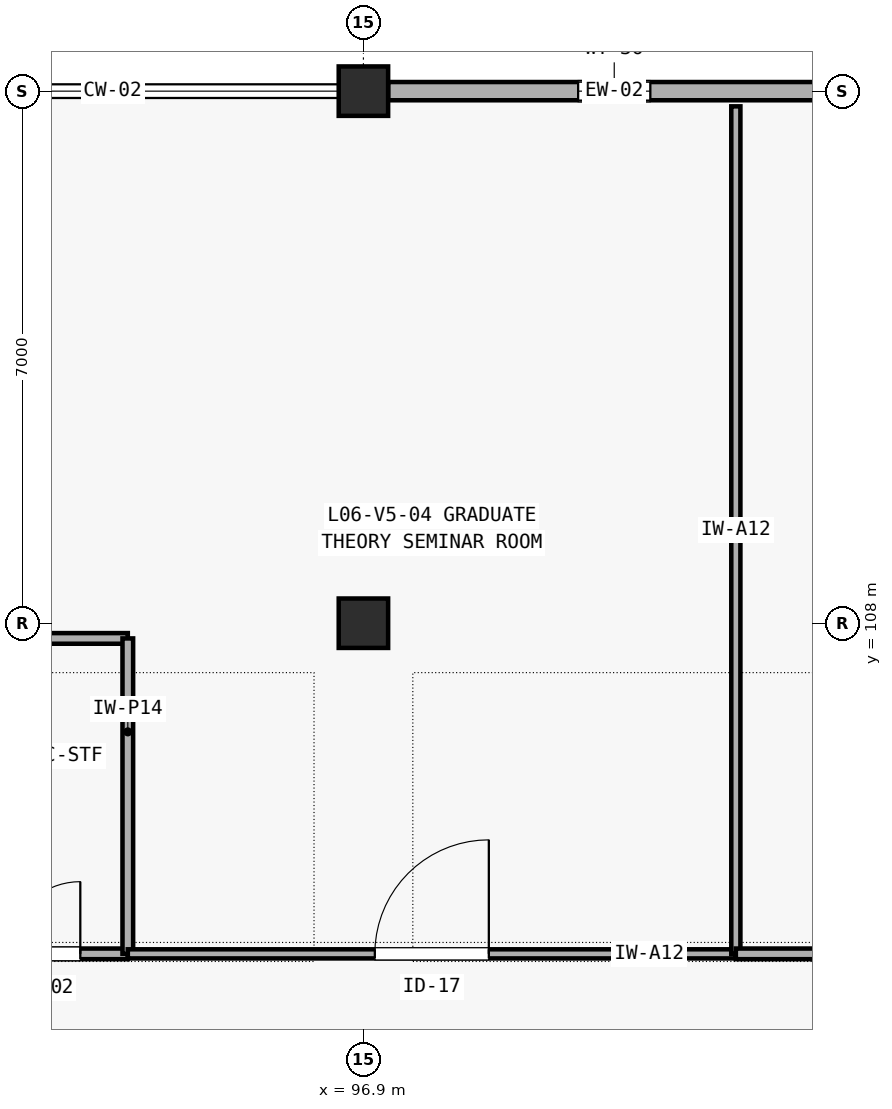
"""IFC4 building model, lengths in metres.
Left out: names, types, materials, properties, quantities, classifications, styles, units other than length and angle.
Written with IfcOpenShell. Run it as: python <this file> out.ifc"""

import sys

from ifc_helpers import new_model, si_unit, direction, frame, frame_2d, origin, origin_2d, place, context, subcontext, project, spatial, rectangle, extrude, element, fill, save


model = new_model("IFC4")
c1 = context("Model", 3, precision=1e-05, world=origin(), true_north=direction((0.0, 1.0)))
c2 = subcontext(c1, "Body", "Model", "MODEL_VIEW")
j1 = project(units=[si_unit("LENGTHUNIT", "METRE"), si_unit("PLANEANGLEUNIT", "RADIAN")], contexts=[c1])
p1 = place(None, origin())
s1 = spatial("IfcSite", under=j1, at=p1, CompositionType="ELEMENT")
p2 = place(p1, origin())
s2 = spatial("IfcBuilding", under=s1, at=p2, CompositionType="ELEMENT")
p3 = place(p2, frame((0.0, 0.0, 25.2)))
s3 = spatial("IfcBuildingStorey", under=s2, at=p3, CompositionType="ELEMENT", Elevation=25.2)
for number, where, z_axis, x_axis in (
    (1, (96.9, 108.0, 0.0), (0.0, 0.0, 1.0), (1.0, 0.0, 0.0)),
    (2, (96.9, 115.0, 0.0), (0.0, 0.0, 1.0), (1.0, 0.0, 0.0)),
):
    element("IfcColumn", number, at=place(p3, frame(where, z_axis=z_axis, x_axis=x_axis)), inside=s3, PredefinedType="COLUMN", context=c2, shape_type="SweptSolid", body=[
        extrude(rectangle(XDim=0.65, YDim=0.65, at=origin_2d()), origin(), (0.0, 0.0, 1.0), 4.2),
    ])
p4 = place(p3, frame((97.225, 115.0, 0.0), z_axis=(0.0, 0.0, 1.0), x_axis=(1.0, 0.0, 0.0)))
e3 = element("IfcWall", 3, at=p4, inside=s3, PredefinedType="SOLIDWALL", context=c2, shape_type="SweptSolid", body=[
    extrude(rectangle(XDim=5.95, YDim=0.24, at=frame_2d((2.975, 0.0))), origin(), (0.0, 0.0, 1.0), 3.285),
])
p5 = place(p4, frame((2.5, 0.0, 0.85)))
e4 = element("IfcOpeningElement", 4, at=p5, cuts=e3, PredefinedType="OPENING", context=c2, shape_type="SweptSolid", body=[
    extrude(rectangle(XDim=0.95, YDim=1.55, at=frame_2d((0.475, 0.775))), frame((0.0, 0.13, 0.0), z_axis=(0.0, -1.0, 0.0), x_axis=(1.0, 0.0, 0.0)), (0.0, 0.0, 1.0), 0.26),
])
p6 = place(p3, frame((91.6, 103.65, 0.0), z_axis=(0.0, 0.0, 1.0), x_axis=(1.0, 0.0, 0.0)))
e5 = element("IfcWall", 5, at=p6, inside=s3, PredefinedType="PLUMBINGWALL", context=c2, shape_type="SweptSolid", body=[
    extrude(rectangle(XDim=2.2, YDim=0.14, at=frame_2d((1.1, 0.0))), origin(), (0.0, 0.0, 1.0), 3.9),
])
p7 = place(p6, frame((0.625, 0.0, 0.0)))
e6 = element("IfcOpeningElement", 6, at=p7, cuts=e5, PredefinedType="OPENING", context=c2, shape_type="SweptSolid", body=[
    extrude(rectangle(XDim=0.95, YDim=2.1, at=frame_2d((0.475, 1.05))), frame((0.0, 0.08, 0.0), z_axis=(0.0, -1.0, 0.0), x_axis=(1.0, 0.0, 0.0)), (0.0, 0.0, 1.0), 0.16),
])
p8 = place(p3, frame((91.6, 107.8, 0.0), z_axis=(0.0, 0.0, 1.0), x_axis=(1.0, 0.0, 0.0)))
e7 = element("IfcWall", 7, at=p8, inside=s3, PredefinedType="PLUMBINGWALL", context=c2, shape_type="SweptSolid", body=[
    extrude(rectangle(XDim=2.2, YDim=0.14, at=frame_2d((1.1, 0.0))), origin(), (0.0, 0.0, 1.0), 3.235),
])
p9 = place(p3, frame((93.8, 103.65, 0.0), z_axis=(0.0, 0.0, 1.0), x_axis=(0.0, 1.0, 0.0)))
e8 = element("IfcWall", 8, at=p9, inside=s3, PredefinedType="PLUMBINGWALL", context=c2, shape_type="SweptSolid", body=[
    extrude(rectangle(XDim=4.15, YDim=0.14, at=frame_2d((2.075, 0.0))), origin(), (0.0, 0.0, 1.0), 3.9),
])
p10 = place(p3, frame((93.8, 103.65, 0.0), z_axis=(0.0, 0.0, 1.0), x_axis=(1.0, 0.0, 0.0)))
e9 = element("IfcWall", 9, at=p10, inside=s3, PredefinedType="PARTITIONING", context=c2, shape_type="SweptSolid", body=[
    extrude(rectangle(XDim=8.0, YDim=0.12, at=frame_2d((4.0, 0.0))), origin(), (0.0, 0.0, 1.0), 3.9),
])
p11 = place(p10, frame((3.25, 0.0, 0.0)))
e10 = element("IfcOpeningElement", 10, at=p11, cuts=e9, PredefinedType="OPENING", context=c2, shape_type="SweptSolid", body=[
    extrude(rectangle(XDim=1.5, YDim=2.15, at=frame_2d((0.75, 1.075))), frame((0.0, 0.07, 0.0), z_axis=(0.0, -1.0, 0.0), x_axis=(1.0, 0.0, 0.0)), (0.0, 0.0, 1.0), 0.14),
])
p12 = place(p3, frame((101.8, 103.65, 0.0), z_axis=(0.0, 0.0, 1.0), x_axis=(0.0, 1.0, 0.0)))
e11 = element("IfcWall", 11, at=p12, inside=s3, PredefinedType="PARTITIONING", context=c2, shape_type="SweptSolid", body=[
    extrude(rectangle(XDim=11.15, YDim=0.12, at=frame_2d((5.575, 0.0))), origin(), (0.0, 0.0, 1.0), 3.9),
])
p13 = place(p3, frame((101.8, 103.65, 0.0), z_axis=(0.0, 0.0, 1.0), x_axis=(1.0, 0.0, 0.0)))
e12 = element("IfcWall", 12, at=p13, inside=s3, PredefinedType="PLUMBINGWALL", context=c2, shape_type="SweptSolid", body=[
    extrude(rectangle(XDim=8.1, YDim=0.14, at=frame_2d((4.05, 0.0))), origin(), (0.0, 0.0, 1.0), 3.9),
])
p14 = place(p13, frame((3.2, 0.0, 0.0)))
e13 = element("IfcOpeningElement", 13, at=p14, cuts=e12, PredefinedType="OPENING", context=c2, shape_type="SweptSolid", body=[
    extrude(rectangle(XDim=1.7, YDim=2.2, at=frame_2d((0.85, 1.1))), frame((0.0, 0.08, 0.0), z_axis=(0.0, -1.0, 0.0), x_axis=(1.0, 0.0, 0.0)), (0.0, 0.0, 1.0), 0.16),
])
p15 = place(p5, origin())
e14 = element("IfcWindow", 14, at=p15, inside=s3, PartitioningType="SINGLE_PANEL", PredefinedType="WINDOW", context=c2, shape_type="SweptSolid", body=[
    extrude(rectangle(XDim=0.95, YDim=1.55, at=frame_2d((0.475, 0.775))), frame((0.0, 0.03, 0.0), z_axis=(0.0, -1.0, 0.0), x_axis=(1.0, 0.0, 0.0)), (0.0, 0.0, 1.0), 0.06),
])
fill(e4, e14)
p16 = place(p7, origin())
e15 = element("IfcDoor", 15, at=p16, inside=s3, OperationType="SINGLE_SWING_RIGHT", PredefinedType="DOOR", context=c2, shape_type="SweptSolid", body=[
    extrude(rectangle(XDim=0.95, YDim=2.1, at=frame_2d((0.475, 1.05))), frame((0.0, 0.025, 0.0), z_axis=(0.0, -1.0, 0.0), x_axis=(1.0, 0.0, 0.0)), (0.0, 0.0, 1.0), 0.05),
])
fill(e6, e15)
p17 = place(p11, origin())
e16 = element("IfcDoor", 16, at=p17, inside=s3, OperationType="SINGLE_SWING_RIGHT", PredefinedType="DOOR", context=c2, shape_type="SweptSolid", body=[
    extrude(rectangle(XDim=1.5, YDim=2.15, at=frame_2d((0.75, 1.075))), frame((0.0, 0.025, 0.0), z_axis=(0.0, -1.0, 0.0), x_axis=(1.0, 0.0, 0.0)), (0.0, 0.0, 1.0), 0.05),
])
fill(e10, e16)
save(model, sys.argv[1])
